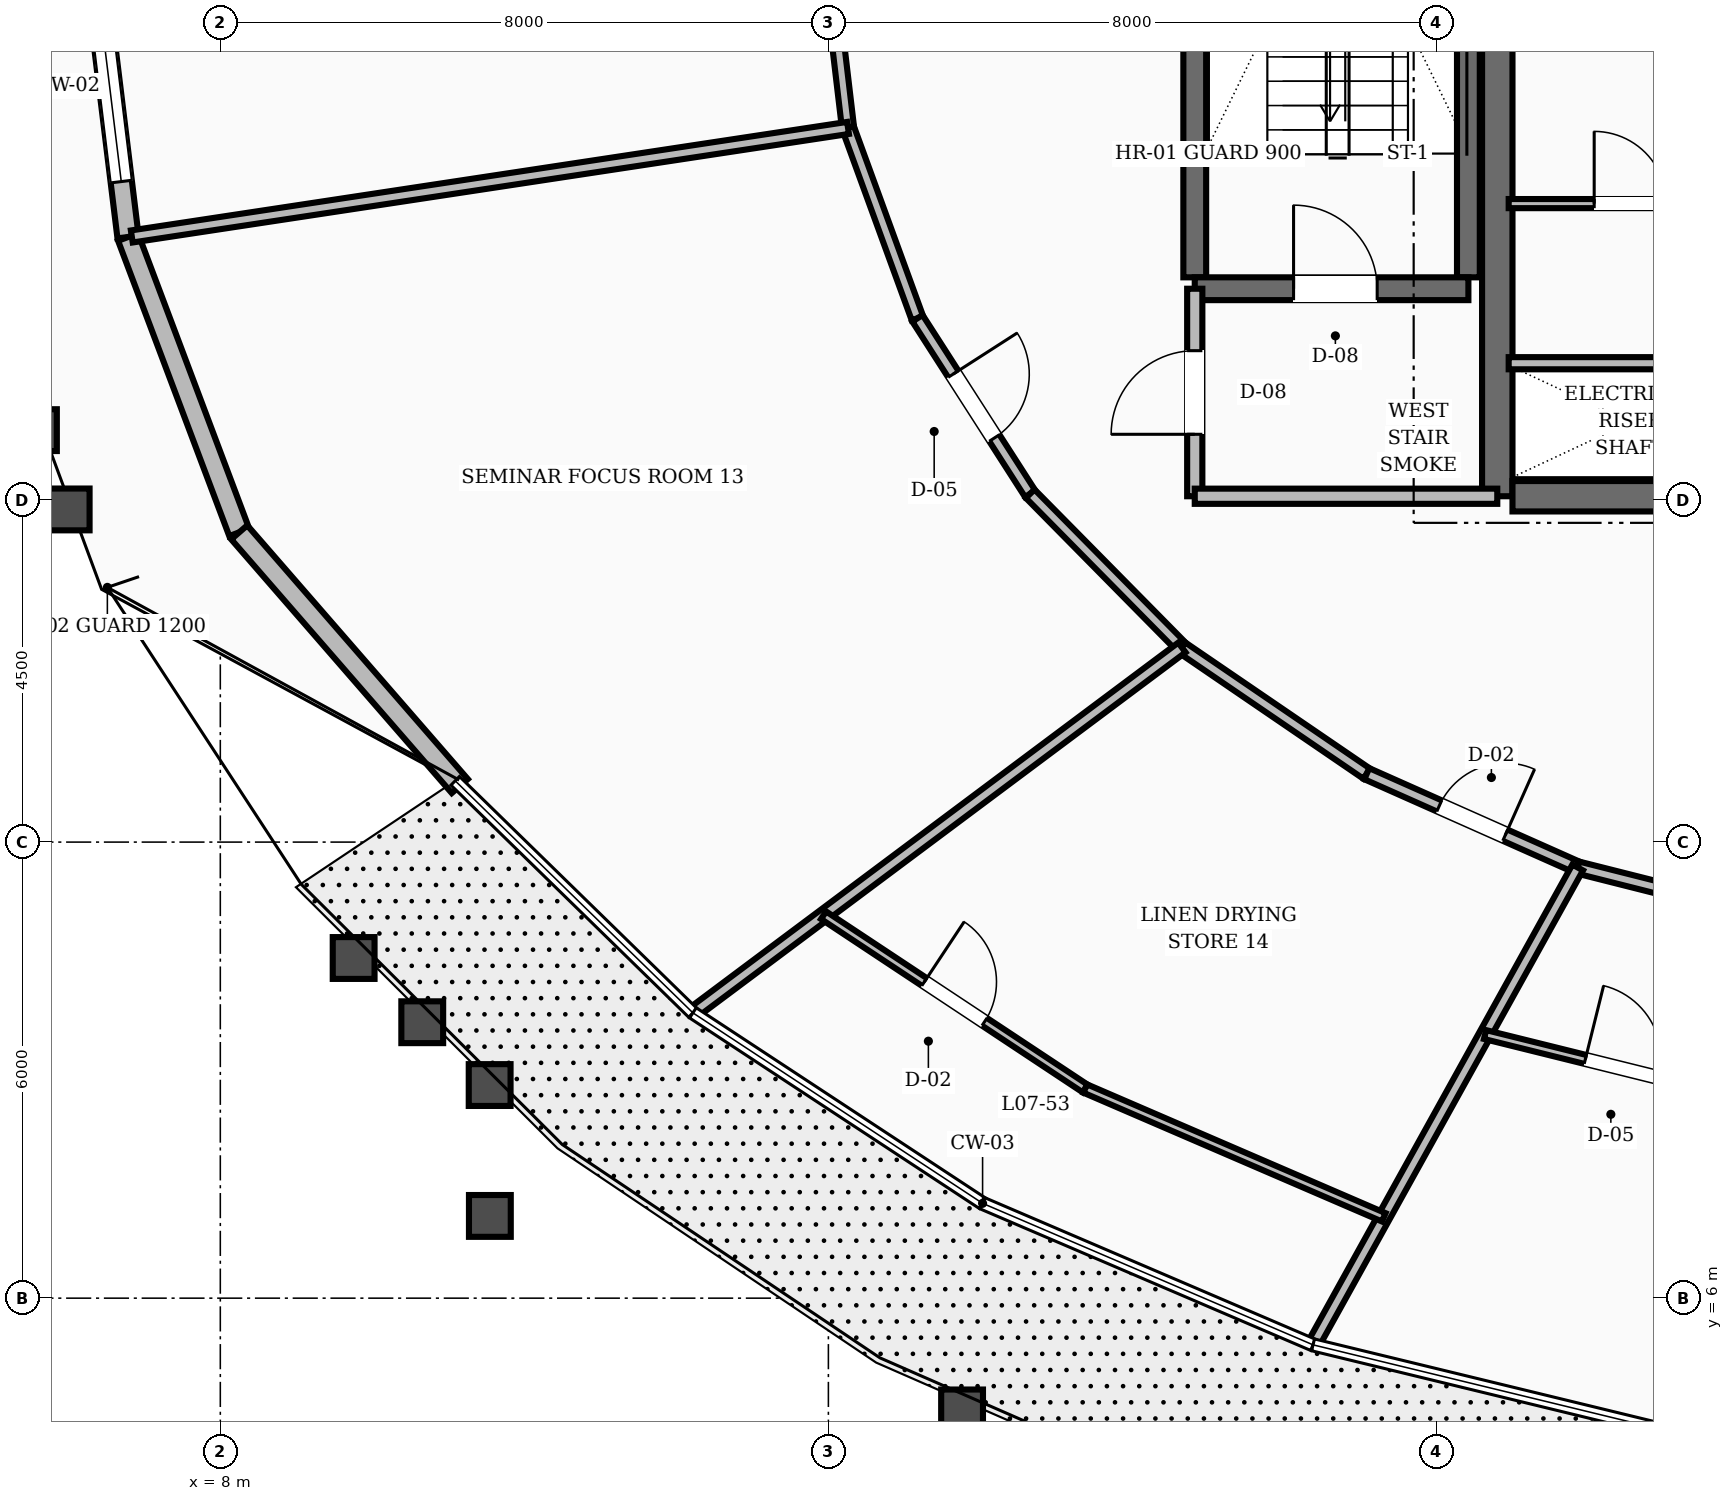
"""IFC4 building model, lengths in metres.
Left out: names, types, materials, properties, quantities, classifications, styles, units other than length and angle.
Written with IfcOpenShell. Run it as: python <this file> out.ifc"""

import sys

from ifc_helpers import new_model, si_unit, direction, frame, frame_2d, origin, place, context, subcontext, project, spatial, rectangle, extrude, element, fill, save


model = new_model("IFC4")
c1 = context("Model", 3, precision=1e-05, world=origin(), true_north=direction((0.0, 1.0)))
c2 = subcontext(c1, "Body", "Model", "MODEL_VIEW")
j1 = project(units=[si_unit("LENGTHUNIT", "METRE"), si_unit("PLANEANGLEUNIT", "RADIAN")], contexts=[c1])
p1 = place(None, origin())
s1 = spatial("IfcSite", under=j1, at=p1, CompositionType="ELEMENT")
p2 = place(p1, origin())
s2 = spatial("IfcBuilding", under=s1, at=p2, CompositionType="ELEMENT")
p3 = place(p2, frame((0.0, 0.0, 34.0)))
s3 = spatial("IfcBuildingStorey", under=s2, at=p3, CompositionType="ELEMENT", Elevation=34.0)
p4 = place(p3, frame((24.8, 16.55, 0.0), z_axis=(0.0, 0.0, 1.0), x_axis=(0.0, 1.0, 0.0)))
e1 = element("IfcWall", 1, at=p4, inside=s3, PredefinedType="SHEAR", context=c2, shape_type="SweptSolid", body=[
    extrude(rectangle(XDim=6.3, YDim=0.4, at=frame_2d((3.15, 0.0))), origin(), (0.0, 0.0, 1.0), 3.6),
])
p5 = place(p3, frame((25.0, 16.55, 0.0), z_axis=(0.0, 0.0, 1.0), x_axis=(1.0, 0.0, 0.0)))
e2 = element("IfcWall", 2, at=p5, inside=s3, PredefinedType="SHEAR", context=c2, shape_type="SweptSolid", body=[
    extrude(rectangle(XDim=3.2, YDim=0.4, at=frame_2d((1.6, 0.0))), origin(), (0.0, 0.0, 1.0), 3.6),
])
for number, where, z_axis, x_axis in (
    (3, (20.82, 19.43, 0.0), (0.0, 0.0, 1.0), (0.0, 1.0, 0.0)),
    (4, (24.42, 19.43, 0.0), (0.0, 0.0, 1.0), (0.0, 1.0, 0.0)),
):
    element("IfcWall", number, at=place(p3, frame(where, z_axis=z_axis, x_axis=x_axis)), inside=s3, PredefinedType="SHEAR", context=c2, shape_type="SweptSolid", body=[
        extrude(rectangle(XDim=8.74, YDim=0.3, at=frame_2d((4.37, 0.0))), origin(), (0.0, 0.0, 1.0), 3.6),
    ])
p6 = place(p3, frame((20.82, 19.28, 0.0), z_axis=(0.0, 0.0, 1.0), x_axis=(1.0, 0.0, 0.0)))
e5 = element("IfcWall", 5, at=p6, inside=s3, PredefinedType="SHEAR", context=c2, shape_type="SweptSolid", body=[
    extrude(rectangle(XDim=3.6, YDim=0.3, at=frame_2d((1.8, 0.0))), origin(), (0.0, 0.0, 1.0), 3.6),
])
p7 = place(p6, frame((1.3, 0.0, 0.0)))
e6 = element("IfcOpeningElement", 6, at=p7, cuts=e5, PredefinedType="OPENING", context=c2, shape_type="SweptSolid", body=[
    extrude(rectangle(XDim=1.1, YDim=2.1, at=frame_2d((0.55, 1.05))), frame((0.0, 0.16, 0.0), z_axis=(0.0, -1.0, 0.0), x_axis=(1.0, 0.0, 0.0)), (0.0, 0.0, 1.0), 0.32),
])
p8 = place(p3, frame((6.292, 24.0, 0.0), z_axis=(0.0, 0.0, 1.0), x_axis=(0.12141333898, -0.99260203562, 0.0)))
e7 = element("IfcWall", 7, at=p8, inside=s3, PredefinedType="STANDARD", context=c2, shape_type="SweptSolid", body=[
    extrude(rectangle(XDim=4.07, YDim=0.28, at=frame_2d((2.035, 0.0))), origin(), (0.0, 0.0, 1.0), 2.65),
])
p9 = place(p8, frame((0.735, 0.0, 0.8)))
e8 = element("IfcOpeningElement", 8, at=p9, cuts=e7, PredefinedType="OPENING", context=c2, shape_type="SweptSolid", body=[
    extrude(rectangle(XDim=2.6, YDim=1.65, at=frame_2d((1.3, 0.825))), frame((0.0, 0.15, 0.0), z_axis=(0.0, -1.0, 0.0), x_axis=(1.0, 0.0, 0.0)), (0.0, 0.0, 1.0), 0.3),
])
p10 = place(p3, frame((6.786, 19.96, 0.0), z_axis=(0.0, 0.0, 1.0), x_axis=(0.352412178014, -0.935844889278, 0.0)))
e9 = element("IfcWall", 9, at=p10, inside=s3, PredefinedType="STANDARD", context=c2, shape_type="SweptSolid", body=[
    extrude(rectangle(XDim=4.151, YDim=0.28, at=frame_2d((2.076, 0.0))), origin(), (0.0, 0.0, 1.0), 2.65),
])
p11 = place(p3, frame((8.249, 16.075, 0.0), z_axis=(0.0, 0.0, 1.0), x_axis=(0.656007880753, -0.754754039665, 0.0)))
e10 = element("IfcWall", 10, at=p11, inside=s3, PredefinedType="STANDARD", context=c2, shape_type="SweptSolid", body=[
    extrude(rectangle(XDim=4.423, YDim=0.28, at=frame_2d((2.211, 0.0))), origin(), (0.0, 0.0, 1.0), 2.65),
])
p12 = place(p3, frame((20.82, 16.55, 0.0), z_axis=(0.0, 0.0, 1.0), x_axis=(0.0, 1.0, 0.0)))
e11 = element("IfcWall", 11, at=p12, inside=s3, PredefinedType="SOLIDWALL", context=c2, shape_type="SweptSolid", body=[
    extrude(rectangle(XDim=2.73, YDim=0.2, at=frame_2d((1.365, 0.0))), origin(), (0.0, 0.0, 1.0), 2.61),
])
p13 = place(p12, frame((0.815, 0.0, 0.0)))
e12 = element("IfcOpeningElement", 12, at=p13, cuts=e11, PredefinedType="OPENING", context=c2, shape_type="SweptSolid", body=[
    extrude(rectangle(XDim=1.1, YDim=2.1, at=frame_2d((0.55, 1.05))), frame((0.0, 0.11, 0.0), z_axis=(0.0, -1.0, 0.0), x_axis=(1.0, 0.0, 0.0)), (0.0, 0.0, 1.0), 0.22),
])
p14 = place(p3, frame((20.82, 16.55, 0.0), z_axis=(0.0, 0.0, 1.0), x_axis=(1.0, 0.0, 0.0)))
e13 = element("IfcWall", 13, at=p14, inside=s3, PredefinedType="SOLIDWALL", context=c2, shape_type="SweptSolid", body=[
    extrude(rectangle(XDim=3.98, YDim=0.2, at=frame_2d((1.99, 0.0))), origin(), (0.0, 0.0, 1.0), 2.61),
])
p15 = place(p3, frame((24.95, 18.3, 0.0), z_axis=(0.0, 0.0, 1.0), x_axis=(1.0, 0.0, 0.0)))
e14 = element("IfcWall", 14, at=p15, inside=s3, PredefinedType="SOLIDWALL", context=c2, shape_type="SweptSolid", body=[
    extrude(rectangle(XDim=3.2, YDim=0.16, at=frame_2d((1.6, 0.0))), origin(), (0.0, 0.0, 1.0), 2.61),
])
p16 = place(p3, frame((24.95, 20.4, 0.0), z_axis=(0.0, 0.0, 1.0), x_axis=(1.0, 0.0, 0.0)))
e15 = element("IfcWall", 15, at=p16, inside=s3, PredefinedType="PARTITIONING", context=c2, shape_type="SweptSolid", body=[
    extrude(rectangle(XDim=3.2, YDim=0.12, at=frame_2d((1.6, 0.0))), origin(), (0.0, 0.0, 1.0), 2.61),
])
p17 = place(p16, frame((1.125, 0.0, 0.0)))
e16 = element("IfcOpeningElement", 16, at=p17, cuts=e15, PredefinedType="OPENING", context=c2, shape_type="SweptSolid", body=[
    extrude(rectangle(XDim=0.95, YDim=2.1, at=frame_2d((0.475, 1.05))), frame((0.0, 0.07, 0.0), z_axis=(0.0, -1.0, 0.0), x_axis=(1.0, 0.0, 0.0)), (0.0, 0.0, 1.0), 0.14),
])
p18 = place(p3, frame((15.95, 24.0, 0.0), z_axis=(0.0, 0.0, 1.0), x_axis=(0.117570353762, -0.993064555765, 0.0)))
e17 = element("IfcWall", 17, at=p18, inside=s3, PredefinedType="SOLIDWALL", context=c2, shape_type="SweptSolid", body=[
    extrude(rectangle(XDim=2.623, YDim=0.16, at=frame_2d((1.312, 0.0))), origin(), (0.0, 0.0, 1.0), 2.61),
])
p19 = place(p3, frame((16.258, 21.396, 0.0), z_axis=(0.0, 0.0, 1.0), x_axis=(0.342617982381, -0.939474809747, 0.0)))
e18 = element("IfcWall", 18, at=p19, inside=s3, PredefinedType="SOLIDWALL", context=c2, shape_type="SweptSolid", body=[
    extrude(rectangle(XDim=2.666, YDim=0.16, at=frame_2d((1.333, 0.0))), origin(), (0.0, 0.0, 1.0), 2.61),
])
p20 = place(p3, frame((17.172, 18.891, 0.0), z_axis=(0.0, 0.0, 1.0), x_axis=(0.540595670038, -0.841282545603, 0.0)))
e19 = element("IfcWall", 19, at=p20, inside=s3, PredefinedType="SOLIDWALL", context=c2, shape_type="SweptSolid", body=[
    extrude(rectangle(XDim=2.744, YDim=0.16, at=frame_2d((1.372, 0.0))), origin(), (0.0, 0.0, 1.0), 2.61),
])
p21 = place(p20, frame((0.872, 0.0, 0.0)))
e20 = element("IfcOpeningElement", 20, at=p21, cuts=e19, PredefinedType="OPENING", context=c2, shape_type="SweptSolid", body=[
    extrude(rectangle(XDim=1.0, YDim=2.1, at=frame_2d((0.5, 1.05))), frame((0.0, 0.09, 0.0), z_axis=(0.0, -1.0, 0.0), x_axis=(1.0, 0.0, 0.0)), (0.0, 0.0, 1.0), 0.18),
])
p22 = place(p3, frame((18.655, 16.583, 0.0), z_axis=(0.0, 0.0, 1.0), x_axis=(0.702366174226, -0.711815816981, 0.0)))
e21 = element("IfcWall", 21, at=p22, inside=s3, PredefinedType="SOLIDWALL", context=c2, shape_type="SweptSolid", body=[
    extrude(rectangle(XDim=2.842, YDim=0.16, at=frame_2d((1.421, 0.0))), origin(), (0.0, 0.0, 1.0), 2.61),
])
p23 = place(p3, frame((20.651, 14.56, 0.0), z_axis=(0.0, 0.0, 1.0), x_axis=(0.825929039072, -0.563774088104, 0.0)))
e22 = element("IfcWall", 22, at=p23, inside=s3, PredefinedType="SOLIDWALL", context=c2, shape_type="SweptSolid", body=[
    extrude(rectangle(XDim=2.945, YDim=0.16, at=frame_2d((1.472, 0.0))), origin(), (0.0, 0.0, 1.0), 2.61),
])
p24 = place(p3, frame((23.083, 12.9, 0.0), z_axis=(0.0, 0.0, 1.0), x_axis=(0.913768445178, -0.406235434936, 0.0)))
e23 = element("IfcWall", 23, at=p24, inside=s3, PredefinedType="SOLIDWALL", context=c2, shape_type="SweptSolid", body=[
    extrude(rectangle(XDim=3.037, YDim=0.16, at=frame_2d((1.519, 0.0))), origin(), (0.0, 0.0, 1.0), 2.61),
])
p25 = place(p24, frame((1.043, 0.0, 0.0)))
e24 = element("IfcOpeningElement", 24, at=p25, cuts=e23, PredefinedType="OPENING", context=c2, shape_type="SweptSolid", body=[
    extrude(rectangle(XDim=0.95, YDim=2.1, at=frame_2d((0.475, 1.05))), frame((0.0, 0.09, 0.0), z_axis=(0.0, -1.0, 0.0), x_axis=(1.0, 0.0, 0.0)), (0.0, 0.0, 1.0), 0.18),
])
p26 = place(p3, frame((25.858, 11.666, 0.0), z_axis=(0.0, 0.0, 1.0), x_axis=(0.969608333194, -0.244662380029, 0.0)))
e25 = element("IfcWall", 25, at=p26, inside=s3, PredefinedType="SOLIDWALL", context=c2, shape_type="SweptSolid", body=[
    extrude(rectangle(XDim=3.105, YDim=0.16, at=frame_2d((1.553, 0.0))), origin(), (0.0, 0.0, 1.0), 2.61),
])
p27 = place(p3, frame((25.858, 11.666, 0.0), z_axis=(0.0, 0.0, 1.0), x_axis=(-0.484852071717, -0.874596174558, 0.0)))
e26 = element("IfcWall", 26, at=p27, inside=s3, PredefinedType="SOLIDWALL", context=c2, shape_type="SweptSolid", body=[
    extrude(rectangle(XDim=7.131, YDim=0.16, at=frame_2d((3.565, 0.0))), origin(), (0.0, 0.0, 1.0), 2.61),
])
p28 = place(p3, frame((24.639, 9.468, 0.0), z_axis=(0.0, 0.0, 1.0), x_axis=(0.970585132911, -0.240758176957, 0.0)))
e27 = element("IfcWall", 27, at=p28, inside=s3, PredefinedType="PARTITIONING", context=c2, shape_type="SweptSolid", body=[
    extrude(rectangle(XDim=3.718, YDim=0.12, at=frame_2d((1.859, 0.0))), origin(), (0.0, 0.0, 1.0), 2.61),
])
p29 = place(p28, frame((1.359, 0.0, 0.0)))
e28 = element("IfcOpeningElement", 28, at=p29, cuts=e27, PredefinedType="OPENING", context=c2, shape_type="SweptSolid", body=[
    extrude(rectangle(XDim=1.0, YDim=2.1, at=frame_2d((0.5, 1.05))), frame((0.0, 0.07, 0.0), z_axis=(0.0, -1.0, 0.0), x_axis=(1.0, 0.0, 0.0)), (0.0, 0.0, 1.0), 0.14),
])
p30 = place(p3, frame((16.258, 21.396, 0.0), z_axis=(0.0, 0.0, 1.0), x_axis=(-0.988711249667, -0.149833456817, 0.0)))
e29 = element("IfcWall", 29, at=p30, inside=s3, PredefinedType="SOLIDWALL", context=c2, shape_type="SweptSolid", body=[
    extrude(rectangle(XDim=9.531, YDim=0.16, at=frame_2d((4.765, 0.0))), origin(), (0.0, 0.0, 1.0), 2.61),
])
p31 = place(p3, frame((20.651, 14.56, 0.0), z_axis=(0.0, 0.0, 1.0), x_axis=(-0.801077985927, -0.598559989026, 0.0)))
e30 = element("IfcWall", 30, at=p31, inside=s3, PredefinedType="SOLIDWALL", context=c2, shape_type="SweptSolid", body=[
    extrude(rectangle(XDim=7.98, YDim=0.16, at=frame_2d((3.99, 0.0))), origin(), (0.0, 0.0, 1.0), 2.61),
])
p32 = place(p3, frame((15.937, 11.038, 0.0), z_axis=(0.0, 0.0, 1.0), x_axis=(0.833756488453, -0.552132337364, 0.0)))
e31 = element("IfcWall", 31, at=p32, inside=s3, PredefinedType="PARTITIONING", context=c2, shape_type="SweptSolid", body=[
    extrude(rectangle(XDim=4.129, YDim=0.12, at=frame_2d((2.064, 0.0))), origin(), (0.0, 0.0, 1.0), 2.61),
])
p33 = place(p32, frame((1.59, 0.0, 0.0)))
e32 = element("IfcOpeningElement", 32, at=p33, cuts=e31, PredefinedType="OPENING", context=c2, shape_type="SweptSolid", body=[
    extrude(rectangle(XDim=0.95, YDim=2.1, at=frame_2d((0.475, 1.05))), frame((0.0, 0.07, 0.0), z_axis=(0.0, -1.0, 0.0), x_axis=(1.0, 0.0, 0.0)), (0.0, 0.0, 1.0), 0.14),
])
p34 = place(p3, frame((19.379, 8.758, 0.0), z_axis=(0.0, 0.0, 1.0), x_axis=(0.918212434059, -0.396088280488, 0.0)))
e33 = element("IfcWall", 33, at=p34, inside=s3, PredefinedType="PARTITIONING", context=c2, shape_type="SweptSolid", body=[
    extrude(rectangle(XDim=4.277, YDim=0.12, at=frame_2d((2.139, 0.0))), origin(), (0.0, 0.0, 1.0), 2.61),
])
p35 = place(p9, origin())
e34 = element("IfcWindow", 34, at=p35, inside=s3, PartitioningType="SINGLE_PANEL", PredefinedType="WINDOW", context=c2, shape_type="SweptSolid", body=[
    extrude(rectangle(XDim=2.6, YDim=1.65, at=frame_2d((1.3, 0.825))), frame((0.0, 0.03, 0.0), z_axis=(0.0, -1.0, 0.0), x_axis=(1.0, 0.0, 0.0)), (0.0, 0.0, 1.0), 0.06),
])
fill(e8, e34)
p36 = place(p7, origin())
e35 = element("IfcDoor", 35, at=p36, inside=s3, OperationType="SINGLE_SWING_LEFT", PredefinedType="DOOR", context=c2, shape_type="SweptSolid", body=[
    extrude(rectangle(XDim=1.1, YDim=2.1, at=frame_2d((0.55, 1.05))), frame((0.0, 0.025, 0.0), z_axis=(0.0, -1.0, 0.0), x_axis=(1.0, 0.0, 0.0)), (0.0, 0.0, 1.0), 0.05),
])
fill(e6, e35)
p37 = place(p13, origin())
e36 = element("IfcDoor", 36, at=p37, inside=s3, OperationType="SINGLE_SWING_LEFT", PredefinedType="DOOR", context=c2, shape_type="SweptSolid", body=[
    extrude(rectangle(XDim=1.1, YDim=2.1, at=frame_2d((0.55, 1.05))), frame((0.0, 0.025, 0.0), z_axis=(0.0, -1.0, 0.0), x_axis=(1.0, 0.0, 0.0)), (0.0, 0.0, 1.0), 0.05),
])
fill(e12, e36)
p38 = place(p17, origin())
e37 = element("IfcDoor", 37, at=p38, inside=s3, OperationType="SINGLE_SWING_LEFT", PredefinedType="DOOR", context=c2, shape_type="SweptSolid", body=[
    extrude(rectangle(XDim=0.95, YDim=2.1, at=frame_2d((0.475, 1.05))), frame((0.0, 0.025, 0.0), z_axis=(0.0, -1.0, 0.0), x_axis=(1.0, 0.0, 0.0)), (0.0, 0.0, 1.0), 0.05),
])
fill(e16, e37)
p39 = place(p29, origin())
e38 = element("IfcDoor", 38, at=p39, inside=s3, OperationType="SINGLE_SWING_LEFT", PredefinedType="DOOR", context=c2, shape_type="SweptSolid", body=[
    extrude(rectangle(XDim=1.0, YDim=2.1, at=frame_2d((0.5, 1.05))), frame((0.0, 0.025, 0.0), z_axis=(0.0, -1.0, 0.0), x_axis=(1.0, 0.0, 0.0)), (0.0, 0.0, 1.0), 0.05),
])
fill(e28, e38)
p40 = place(p21, origin())
e39 = element("IfcDoor", 39, at=p40, inside=s3, OperationType="SINGLE_SWING_LEFT", PredefinedType="DOOR", context=c2, shape_type="SweptSolid", body=[
    extrude(rectangle(XDim=1.0, YDim=2.1, at=frame_2d((0.5, 1.05))), frame((0.0, 0.025, 0.0), z_axis=(0.0, -1.0, 0.0), x_axis=(1.0, 0.0, 0.0)), (0.0, 0.0, 1.0), 0.05),
])
fill(e20, e39)
p41 = place(p25, origin())
e40 = element("IfcDoor", 40, at=p41, inside=s3, OperationType="SINGLE_SWING_RIGHT", PredefinedType="DOOR", context=c2, shape_type="SweptSolid", body=[
    extrude(rectangle(XDim=0.95, YDim=2.1, at=frame_2d((0.475, 1.05))), frame((0.0, 0.025, 0.0), z_axis=(0.0, -1.0, 0.0), x_axis=(1.0, 0.0, 0.0)), (0.0, 0.0, 1.0), 0.05),
])
fill(e24, e40)
p42 = place(p33, origin())
e41 = element("IfcDoor", 41, at=p42, inside=s3, OperationType="SINGLE_SWING_LEFT", PredefinedType="DOOR", context=c2, shape_type="SweptSolid", body=[
    extrude(rectangle(XDim=0.95, YDim=2.1, at=frame_2d((0.475, 1.05))), frame((0.0, 0.025, 0.0), z_axis=(0.0, -1.0, 0.0), x_axis=(1.0, 0.0, 0.0)), (0.0, 0.0, 1.0), 0.05),
])
fill(e32, e41)
save(model, sys.argv[1])
